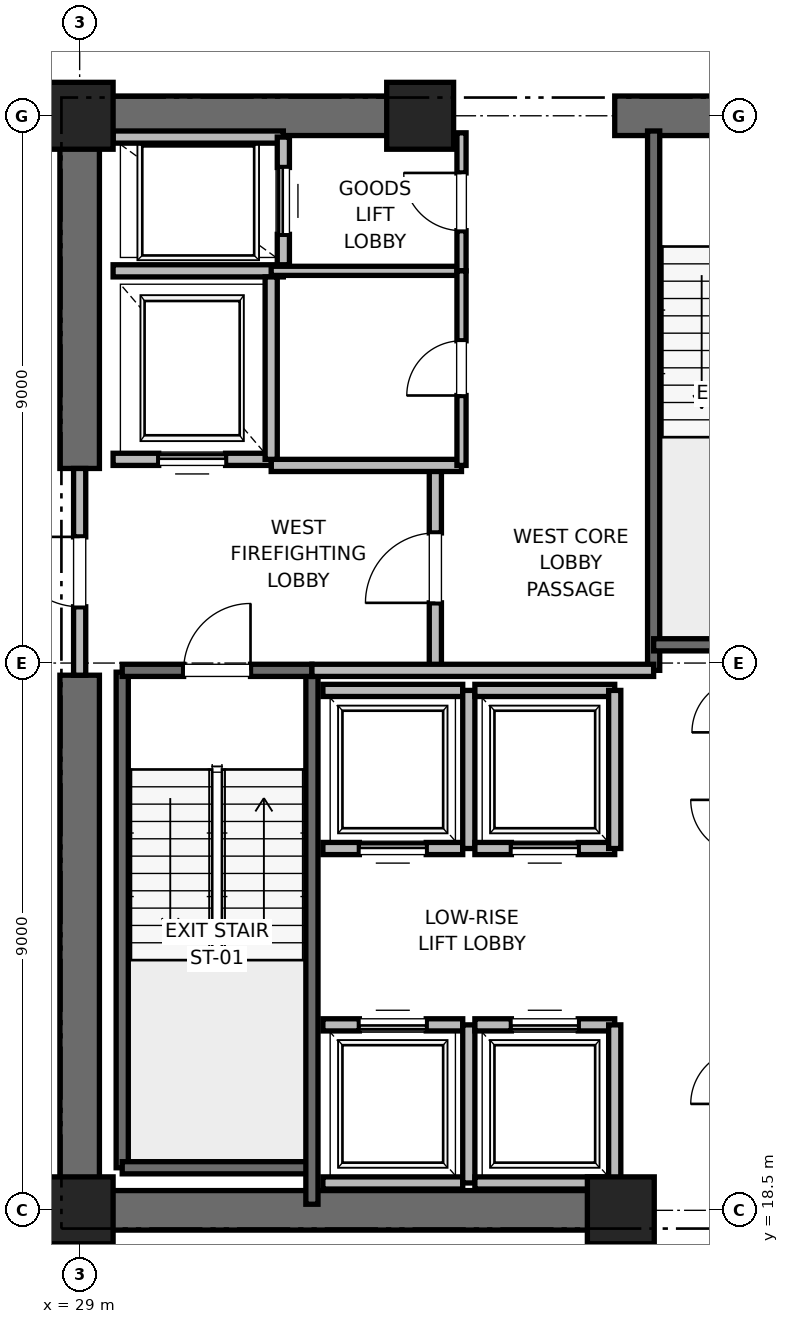
"""IFC4 building model, lengths in metres.
Left out: names, types, materials, properties, quantities, classifications, styles, units other than length and angle.
Written with IfcOpenShell. Run it as: python <this file> out.ifc"""

import sys

from ifc_helpers import new_model, si_unit, direction, frame, frame_2d, origin, origin_2d, place, context, subcontext, project, spatial, rectangle, extrude, element, fill, save


model = new_model("IFC4")
c1 = context("Model", 3, precision=1e-05, world=origin(), true_north=direction((0.0, 1.0)))
c2 = subcontext(c1, "Body", "Model", "MODEL_VIEW")
j1 = project(units=[si_unit("LENGTHUNIT", "METRE"), si_unit("PLANEANGLEUNIT", "RADIAN")], contexts=[c1])
p1 = place(None, origin())
s1 = spatial("IfcSite", under=j1, at=p1, CompositionType="ELEMENT")
p2 = place(p1, origin())
s2 = spatial("IfcBuilding", under=s1, at=p2, CompositionType="ELEMENT")
p3 = place(p2, frame((0.0, 0.0, 43.6)))
s3 = spatial("IfcBuildingStorey", under=s2, at=p3, CompositionType="ELEMENT", Elevation=43.6)
for number, where, z_axis, x_axis in (
    (1, (29.0, 18.5, 0.0), (0.0, 0.0, 1.0), (1.0, 0.0, 0.0)),
    (2, (29.0, 36.5, 0.0), (0.0, 0.0, 1.0), (1.0, 0.0, 0.0)),
    (3, (37.9, 18.5, 0.0), (0.0, 0.0, 1.0), (1.0, 0.0, 0.0)),
    (4, (34.6, 36.5, 0.0), (0.0, 0.0, 1.0), (1.0, 0.0, 0.0)),
):
    element("IfcColumn", number, at=place(p3, frame(where, z_axis=z_axis, x_axis=x_axis)), inside=s3, PredefinedType="PILASTER", context=c2, shape_type="SweptSolid", body=[
        extrude(rectangle(XDim=1.1, YDim=1.1, at=origin_2d()), origin(), (0.0, 0.0, 1.0), 4.0),
    ])
p4 = place(p3, frame((29.0, 18.5, 0.0), z_axis=(0.0, 0.0, 1.0), x_axis=(1.0, 0.0, 0.0)))
e5 = element("IfcWall", 5, at=p4, inside=s3, PredefinedType="SHEAR", context=c2, shape_type="SweptSolid", body=[
    extrude(rectangle(XDim=9.2, YDim=0.65, at=frame_2d((4.6, 0.0))), origin(), (0.0, 0.0, 1.0), 3.76),
])
p5 = place(p3, frame((29.0, 36.5, 0.0), z_axis=(0.0, 0.0, 1.0), x_axis=(1.0, 0.0, 0.0)))
e6 = element("IfcWall", 6, at=p5, inside=s3, PredefinedType="SHEAR", context=c2, shape_type="SweptSolid", body=[
    extrude(rectangle(XDim=5.8, YDim=0.65, at=frame_2d((2.9, 0.0))), origin(), (0.0, 0.0, 1.0), 3.76),
])
p6 = place(p3, frame((37.8, 36.5, 0.0), z_axis=(0.0, 0.0, 1.0), x_axis=(1.0, 0.0, 0.0)))
e7 = element("IfcWall", 7, at=p6, inside=s3, PredefinedType="SHEAR", context=c2, shape_type="SweptSolid", body=[
    extrude(rectangle(XDim=4.4, YDim=0.65, at=frame_2d((2.2, 0.0))), origin(), (0.0, 0.0, 1.0), 3.76),
])
p7 = place(p6, frame((1.65, 0.0, 0.0)))
e8 = element("IfcOpeningElement", 8, at=p7, cuts=e7, PredefinedType="OPENING", context=c2, shape_type="SweptSolid", body=[
    extrude(rectangle(XDim=1.1, YDim=2.15, at=frame_2d((0.55, 1.075))), frame((0.0, 0.325, 0.0), z_axis=(0.0, -1.0, 0.0), x_axis=(1.0, 0.0, 0.0)), (0.0, 0.0, 1.0), 0.65),
])
p8 = place(p3, frame((29.0, 18.5, 0.0), z_axis=(0.0, 0.0, 1.0), x_axis=(0.0, 1.0, 0.0)))
e9 = element("IfcWall", 9, at=p8, inside=s3, PredefinedType="SHEAR", context=c2, shape_type="SweptSolid", body=[
    extrude(rectangle(XDim=8.8, YDim=0.65, at=frame_2d((4.4, 0.0))), origin(), (0.0, 0.0, 1.0), 3.76),
])
p9 = place(p3, frame((29.0, 30.7, 0.0), z_axis=(0.0, 0.0, 1.0), x_axis=(0.0, 1.0, 0.0)))
e10 = element("IfcWall", 10, at=p9, inside=s3, PredefinedType="SHEAR", context=c2, shape_type="SweptSolid", body=[
    extrude(rectangle(XDim=5.8, YDim=0.65, at=frame_2d((2.9, 0.0))), origin(), (0.0, 0.0, 1.0), 3.76),
])
p10 = place(p3, frame((29.7, 19.2, 0.0), z_axis=(0.0, 0.0, 1.0), x_axis=(0.0, 1.0, 0.0)))
e11 = element("IfcWall", 11, at=p10, inside=s3, PredefinedType="SOLIDWALL", context=c2, shape_type="SweptSolid", body=[
    extrude(rectangle(XDim=8.15, YDim=0.2, at=frame_2d((4.075, 0.0))), origin(), (0.0, 0.0, 1.0), 3.76),
])
p11 = place(p3, frame((29.7, 19.2, 0.0), z_axis=(0.0, 0.0, 1.0), x_axis=(1.0, 0.0, 0.0)))
e12 = element("IfcWall", 12, at=p11, inside=s3, PredefinedType="SOLIDWALL", context=c2, shape_type="SweptSolid", body=[
    extrude(rectangle(XDim=3.12, YDim=0.2, at=frame_2d((1.56, 0.0))), origin(), (0.0, 0.0, 1.0), 3.76),
])
p12 = place(p3, frame((32.82, 18.6, 0.0), z_axis=(0.0, 0.0, 1.0), x_axis=(0.0, 1.0, 0.0)))
e13 = element("IfcWall", 13, at=p12, inside=s3, PredefinedType="SOLIDWALL", context=c2, shape_type="SweptSolid", body=[
    extrude(rectangle(XDim=8.78, YDim=0.2, at=frame_2d((4.39, 0.0))), origin(), (0.0, 0.0, 1.0), 3.76),
])
p13 = place(p3, frame((29.7, 27.38, 0.0), z_axis=(0.0, 0.0, 1.0), x_axis=(1.0, 0.0, 0.0)))
e14 = element("IfcWall", 14, at=p13, inside=s3, PredefinedType="SOLIDWALL", context=c2, shape_type="SweptSolid", body=[
    extrude(rectangle(XDim=3.12, YDim=0.2, at=frame_2d((1.56, 0.0))), origin(), (0.0, 0.0, 1.0), 3.76),
])
p14 = place(p13, frame((1.01, 0.0, 0.0)))
e15 = element("IfcOpeningElement", 15, at=p14, cuts=e14, PredefinedType="OPENING", context=c2, shape_type="SweptSolid", body=[
    extrude(rectangle(XDim=1.1, YDim=2.15, at=frame_2d((0.55, 1.075))), frame((0.0, 0.1, 0.0), z_axis=(0.0, -1.0, 0.0), x_axis=(1.0, 0.0, 0.0)), (0.0, 0.0, 1.0), 0.2),
])
p15 = place(p3, frame((38.44, 27.38, 0.0), z_axis=(0.0, 0.0, 1.0), x_axis=(0.0, 1.0, 0.0)))
e16 = element("IfcWall", 16, at=p15, inside=s3, PredefinedType="SOLIDWALL", context=c2, shape_type="SweptSolid", body=[
    extrude(rectangle(XDim=8.87, YDim=0.2, at=frame_2d((4.435, 0.0))), origin(), (0.0, 0.0, 1.0), 3.76),
])
p16 = place(p3, frame((38.44, 27.8, 0.0), z_axis=(0.0, 0.0, 1.0), x_axis=(1.0, 0.0, 0.0)))
e17 = element("IfcWall", 17, at=p16, inside=s3, PredefinedType="SOLIDWALL", context=c2, shape_type="SweptSolid", body=[
    extrude(rectangle(XDim=3.32, YDim=0.2, at=frame_2d((1.66, 0.0))), origin(), (0.0, 0.0, 1.0), 3.76),
])
p17 = place(p3, frame((34.85, 27.38, 0.0), z_axis=(0.0, 0.0, 1.0), x_axis=(0.0, 1.0, 0.0)))
e18 = element("IfcWall", 18, at=p17, inside=s3, PredefinedType="PARTITIONING", context=c2, shape_type="SweptSolid", body=[
    extrude(rectangle(XDim=3.37, YDim=0.2, at=frame_2d((1.685, 0.0))), origin(), (0.0, 0.0, 1.0), 3.76),
])
p18 = place(p17, frame((1.11, 0.0, 0.0)))
e19 = element("IfcOpeningElement", 19, at=p18, cuts=e18, PredefinedType="OPENING", context=c2, shape_type="SweptSolid", body=[
    extrude(rectangle(XDim=1.15, YDim=2.2, at=frame_2d((0.575, 1.1))), frame((0.0, 0.1, 0.0), z_axis=(0.0, -1.0, 0.0), x_axis=(1.0, 0.0, 0.0)), (0.0, 0.0, 1.0), 0.2),
])
p19 = place(p3, frame((29.0, 27.3, 0.0), z_axis=(0.0, 0.0, 1.0), x_axis=(0.0, 1.0, 0.0)))
e20 = element("IfcWall", 20, at=p19, inside=s3, PredefinedType="PARTITIONING", context=c2, shape_type="SweptSolid", body=[
    extrude(rectangle(XDim=3.4, YDim=0.2, at=frame_2d((1.7, 0.0))), origin(), (0.0, 0.0, 1.0), 2.54),
])
p20 = place(p19, frame((1.125, 0.0, 0.0)))
e21 = element("IfcOpeningElement", 21, at=p20, cuts=e20, PredefinedType="OPENING", context=c2, shape_type="SweptSolid", body=[
    extrude(rectangle(XDim=1.15, YDim=2.2, at=frame_2d((0.575, 1.1))), frame((0.0, 0.1, 0.0), z_axis=(0.0, -1.0, 0.0), x_axis=(1.0, 0.0, 0.0)), (0.0, 0.0, 1.0), 0.2),
])
p21 = place(p3, frame((32.82, 27.38, 0.0), z_axis=(0.0, 0.0, 1.0), x_axis=(1.0, 0.0, 0.0)))
e22 = element("IfcWall", 22, at=p21, inside=s3, PredefinedType="PARTITIONING", context=c2, shape_type="SweptSolid", body=[
    extrude(rectangle(XDim=5.62, YDim=0.2, at=frame_2d((2.81, 0.0))), origin(), (0.0, 0.0, 1.0), 3.76),
])
p22 = place(p3, frame((32.15, 30.75, 0.0), z_axis=(0.0, 0.0, 1.0), x_axis=(1.0, 0.0, 0.0)))
e23 = element("IfcWall", 23, at=p22, inside=s3, PredefinedType="PARTITIONING", context=c2, shape_type="SweptSolid", body=[
    extrude(rectangle(XDim=3.13, YDim=0.2, at=frame_2d((1.565, 0.0))), origin(), (0.0, 0.0, 1.0), 3.76),
])
p23 = place(p3, frame((29.55, 30.85, 0.0), z_axis=(0.0, 0.0, 1.0), x_axis=(1.0, 0.0, 0.0)))
e24 = element("IfcWall", 24, at=p23, inside=s3, PredefinedType="SOLIDWALL", context=c2, shape_type="SweptSolid", body=[
    extrude(rectangle(XDim=2.6, YDim=0.2, at=frame_2d((1.3, 0.0))), origin(), (0.0, 0.0, 1.0), 2.54),
])
p24 = place(p23, frame((0.75, 0.0, 0.0)))
e25 = element("IfcOpeningElement", 25, at=p24, cuts=e24, PredefinedType="OPENING", context=c2, shape_type="SweptSolid", body=[
    extrude(rectangle(XDim=1.1, YDim=2.2, at=frame_2d((0.55, 1.1))), frame((0.0, 0.1, 0.0), z_axis=(0.0, -1.0, 0.0), x_axis=(1.0, 0.0, 0.0)), (0.0, 0.0, 1.0), 0.2),
])
p25 = place(p3, frame((29.55, 33.95, 0.0), z_axis=(0.0, 0.0, 1.0), x_axis=(1.0, 0.0, 0.0)))
e26 = element("IfcWall", 26, at=p25, inside=s3, PredefinedType="SOLIDWALL", context=c2, shape_type="SweptSolid", body=[
    extrude(rectangle(XDim=2.8, YDim=0.2, at=frame_2d((1.4, 0.0))), origin(), (0.0, 0.0, 1.0), 3.76),
])
p26 = place(p3, frame((32.15, 30.85, 0.0), z_axis=(0.0, 0.0, 1.0), x_axis=(0.0, 1.0, 0.0)))
e27 = element("IfcWall", 27, at=p26, inside=s3, PredefinedType="SOLIDWALL", context=c2, shape_type="SweptSolid", body=[
    extrude(rectangle(XDim=3.0, YDim=0.2, at=frame_2d((1.5, 0.0))), origin(), (0.0, 0.0, 1.0), 3.76),
])
p27 = place(p3, frame((32.35, 36.15, 0.0), z_axis=(0.0, 0.0, 1.0), x_axis=(-1.0, 0.0, 0.0)))
e28 = element("IfcWall", 28, at=p27, inside=s3, PredefinedType="SOLIDWALL", context=c2, shape_type="SweptSolid", body=[
    extrude(rectangle(XDim=2.8, YDim=0.2, at=frame_2d((1.4, 0.0))), origin(), (0.0, 0.0, 1.0), 2.889),
])
p28 = place(p3, frame((32.35, 34.05, 0.0), z_axis=(0.0, 0.0, 1.0), x_axis=(0.0, 1.0, 0.0)))
e29 = element("IfcWall", 29, at=p28, inside=s3, PredefinedType="SOLIDWALL", context=c2, shape_type="SweptSolid", body=[
    extrude(rectangle(XDim=2.1, YDim=0.2, at=frame_2d((1.05, 0.0))), origin(), (0.0, 0.0, 1.0), 3.76),
])
p29 = place(p28, frame((0.5, 0.0, 0.0)))
e30 = element("IfcOpeningElement", 30, at=p29, cuts=e29, PredefinedType="OPENING", context=c2, shape_type="SweptSolid", body=[
    extrude(rectangle(XDim=1.1, YDim=2.2, at=frame_2d((0.55, 1.1))), frame((0.0, 0.1, 0.0), z_axis=(0.0, -1.0, 0.0), x_axis=(1.0, 0.0, 0.0)), (0.0, 0.0, 1.0), 0.2),
])
p30 = place(p3, frame((33.0, 18.95, 0.0), z_axis=(0.0, 0.0, 1.0), x_axis=(1.0, 0.0, 0.0)))
e31 = element("IfcWall", 31, at=p30, inside=s3, PredefinedType="SOLIDWALL", context=c2, shape_type="SweptSolid", body=[
    extrude(rectangle(XDim=2.3, YDim=0.2, at=frame_2d((1.15, 0.0))), origin(), (0.0, 0.0, 1.0), 3.76),
])
p31 = place(p3, frame((35.3, 21.55, 0.0), z_axis=(0.0, 0.0, 1.0), x_axis=(-1.0, 0.0, 0.0)))
e32 = element("IfcWall", 32, at=p31, inside=s3, PredefinedType="SOLIDWALL", context=c2, shape_type="SweptSolid", body=[
    extrude(rectangle(XDim=2.3, YDim=0.2, at=frame_2d((1.15, 0.0))), origin(), (0.0, 0.0, 1.0), 3.76),
])
p32 = place(p31, frame((0.6, 0.0, 0.0)))
e33 = element("IfcOpeningElement", 33, at=p32, cuts=e32, PredefinedType="OPENING", context=c2, shape_type="SweptSolid", body=[
    extrude(rectangle(XDim=1.1, YDim=2.2, at=frame_2d((0.55, 1.1))), frame((0.0, 0.1, 0.0), z_axis=(0.0, -1.0, 0.0), x_axis=(1.0, 0.0, 0.0)), (0.0, 0.0, 1.0), 0.2),
])
p33 = place(p3, frame((35.4, 18.95, 0.0), z_axis=(0.0, 0.0, 1.0), x_axis=(0.0, 1.0, 0.0)))
e34 = element("IfcWall", 34, at=p33, inside=s3, PredefinedType="SOLIDWALL", context=c2, shape_type="SweptSolid", body=[
    extrude(rectangle(XDim=2.6, YDim=0.2, at=frame_2d((1.3, 0.0))), origin(), (0.0, 0.0, 1.0), 3.76),
])
p34 = place(p3, frame((35.5, 18.95, 0.0), z_axis=(0.0, 0.0, 1.0), x_axis=(1.0, 0.0, 0.0)))
e35 = element("IfcWall", 35, at=p34, inside=s3, PredefinedType="SOLIDWALL", context=c2, shape_type="SweptSolid", body=[
    extrude(rectangle(XDim=2.3, YDim=0.2, at=frame_2d((1.15, 0.0))), origin(), (0.0, 0.0, 1.0), 2.54),
])
p35 = place(p3, frame((37.8, 21.55, 0.0), z_axis=(0.0, 0.0, 1.0), x_axis=(-1.0, 0.0, 0.0)))
e36 = element("IfcWall", 36, at=p35, inside=s3, PredefinedType="SOLIDWALL", context=c2, shape_type="SweptSolid", body=[
    extrude(rectangle(XDim=2.3, YDim=0.2, at=frame_2d((1.15, 0.0))), origin(), (0.0, 0.0, 1.0), 3.76),
])
p36 = place(p35, frame((0.6, 0.0, 0.0)))
e37 = element("IfcOpeningElement", 37, at=p36, cuts=e36, PredefinedType="OPENING", context=c2, shape_type="SweptSolid", body=[
    extrude(rectangle(XDim=1.1, YDim=2.2, at=frame_2d((0.55, 1.1))), frame((0.0, 0.1, 0.0), z_axis=(0.0, -1.0, 0.0), x_axis=(1.0, 0.0, 0.0)), (0.0, 0.0, 1.0), 0.2),
])
p37 = place(p3, frame((37.8, 18.95, 0.0), z_axis=(0.0, 0.0, 1.0), x_axis=(0.0, 1.0, 0.0)))
e38 = element("IfcWall", 38, at=p37, inside=s3, PredefinedType="SOLIDWALL", context=c2, shape_type="SweptSolid", body=[
    extrude(rectangle(XDim=2.6, YDim=0.2, at=frame_2d((1.3, 0.0))), origin(), (0.0, 0.0, 1.0), 2.54),
])
p38 = place(p3, frame((33.0, 24.45, 0.0), z_axis=(0.0, 0.0, 1.0), x_axis=(1.0, 0.0, 0.0)))
e39 = element("IfcWall", 39, at=p38, inside=s3, PredefinedType="SOLIDWALL", context=c2, shape_type="SweptSolid", body=[
    extrude(rectangle(XDim=2.3, YDim=0.2, at=frame_2d((1.15, 0.0))), origin(), (0.0, 0.0, 1.0), 3.76),
])
p39 = place(p38, frame((0.6, 0.0, 0.0)))
e40 = element("IfcOpeningElement", 40, at=p39, cuts=e39, PredefinedType="OPENING", context=c2, shape_type="SweptSolid", body=[
    extrude(rectangle(XDim=1.1, YDim=2.2, at=frame_2d((0.55, 1.1))), frame((0.0, 0.1, 0.0), z_axis=(0.0, -1.0, 0.0), x_axis=(1.0, 0.0, 0.0)), (0.0, 0.0, 1.0), 0.2),
])
p40 = place(p3, frame((35.3, 27.05, 0.0), z_axis=(0.0, 0.0, 1.0), x_axis=(-1.0, 0.0, 0.0)))
e41 = element("IfcWall", 41, at=p40, inside=s3, PredefinedType="SOLIDWALL", context=c2, shape_type="SweptSolid", body=[
    extrude(rectangle(XDim=2.3, YDim=0.2, at=frame_2d((1.15, 0.0))), origin(), (0.0, 0.0, 1.0), 3.76),
])
p41 = place(p3, frame((35.4, 24.45, 0.0), z_axis=(0.0, 0.0, 1.0), x_axis=(0.0, 1.0, 0.0)))
e42 = element("IfcWall", 42, at=p41, inside=s3, PredefinedType="SOLIDWALL", context=c2, shape_type="SweptSolid", body=[
    extrude(rectangle(XDim=2.6, YDim=0.2, at=frame_2d((1.3, 0.0))), origin(), (0.0, 0.0, 1.0), 3.76),
])
p42 = place(p3, frame((35.5, 24.45, 0.0), z_axis=(0.0, 0.0, 1.0), x_axis=(1.0, 0.0, 0.0)))
e43 = element("IfcWall", 43, at=p42, inside=s3, PredefinedType="SOLIDWALL", context=c2, shape_type="SweptSolid", body=[
    extrude(rectangle(XDim=2.3, YDim=0.2, at=frame_2d((1.15, 0.0))), origin(), (0.0, 0.0, 1.0), 3.76),
])
p43 = place(p42, frame((0.6, 0.0, 0.0)))
e44 = element("IfcOpeningElement", 44, at=p43, cuts=e43, PredefinedType="OPENING", context=c2, shape_type="SweptSolid", body=[
    extrude(rectangle(XDim=1.1, YDim=2.2, at=frame_2d((0.55, 1.1))), frame((0.0, 0.1, 0.0), z_axis=(0.0, -1.0, 0.0), x_axis=(1.0, 0.0, 0.0)), (0.0, 0.0, 1.0), 0.2),
])
p44 = place(p3, frame((37.8, 27.05, 0.0), z_axis=(0.0, 0.0, 1.0), x_axis=(-1.0, 0.0, 0.0)))
e45 = element("IfcWall", 45, at=p44, inside=s3, PredefinedType="SOLIDWALL", context=c2, shape_type="SweptSolid", body=[
    extrude(rectangle(XDim=2.3, YDim=0.2, at=frame_2d((1.15, 0.0))), origin(), (0.0, 0.0, 1.0), 3.76),
])
p45 = place(p3, frame((37.8, 24.45, 0.0), z_axis=(0.0, 0.0, 1.0), x_axis=(0.0, 1.0, 0.0)))
e46 = element("IfcWall", 46, at=p45, inside=s3, PredefinedType="SOLIDWALL", context=c2, shape_type="SweptSolid", body=[
    extrude(rectangle(XDim=2.6, YDim=0.2, at=frame_2d((1.3, 0.0))), origin(), (0.0, 0.0, 1.0), 3.76),
])
p46 = place(p3, frame((32.15, 33.95, 0.0), z_axis=(0.0, 0.0, 1.0), x_axis=(1.0, 0.0, 0.0)))
e47 = element("IfcWall", 47, at=p46, inside=s3, PredefinedType="PARTITIONING", context=c2, shape_type="SweptSolid", body=[
    extrude(rectangle(XDim=3.13, YDim=0.15, at=frame_2d((1.565, 0.0))), origin(), (0.0, 0.0, 1.0), 2.85),
])
p47 = place(p3, frame((35.28, 33.95, 0.0), z_axis=(0.0, 0.0, 1.0), x_axis=(0.0, 1.0, 0.0)))
e48 = element("IfcWall", 48, at=p47, inside=s3, PredefinedType="PARTITIONING", context=c2, shape_type="SweptSolid", body=[
    extrude(rectangle(XDim=2.27, YDim=0.15, at=frame_2d((1.135, 0.0))), origin(), (0.0, 0.0, 1.0), 2.54),
])
p48 = place(p47, frame((0.66, 0.0, 0.0)))
e49 = element("IfcOpeningElement", 49, at=p48, cuts=e48, PredefinedType="OPENING", context=c2, shape_type="SweptSolid", body=[
    extrude(rectangle(XDim=0.95, YDim=2.15, at=frame_2d((0.475, 1.075))), frame((0.0, 0.075, 0.0), z_axis=(0.0, -1.0, 0.0), x_axis=(1.0, 0.0, 0.0)), (0.0, 0.0, 1.0), 0.15),
])
p49 = place(p3, frame((35.28, 30.75, 0.0), z_axis=(0.0, 0.0, 1.0), x_axis=(0.0, 1.0, 0.0)))
e50 = element("IfcWall", 50, at=p49, inside=s3, PredefinedType="PARTITIONING", context=c2, shape_type="SweptSolid", body=[
    extrude(rectangle(XDim=3.2, YDim=0.15, at=frame_2d((1.6, 0.0))), origin(), (0.0, 0.0, 1.0), 2.85),
])
p50 = place(p49, frame((1.15, 0.0, 0.0)))
e51 = element("IfcOpeningElement", 51, at=p50, cuts=e50, PredefinedType="OPENING", context=c2, shape_type="SweptSolid", body=[
    extrude(rectangle(XDim=0.9, YDim=2.1, at=frame_2d((0.45, 1.05))), frame((0.0, 0.075, 0.0), z_axis=(0.0, -1.0, 0.0), x_axis=(1.0, 0.0, 0.0)), (0.0, 0.0, 1.0), 0.15),
])
p51 = place(p14, origin())
e52 = element("IfcDoor", 52, at=p51, inside=s3, OperationType="SINGLE_SWING_RIGHT", PredefinedType="DOOR", context=c2, shape_type="SweptSolid", body=[
    extrude(rectangle(XDim=1.1, YDim=2.15, at=frame_2d((0.55, 1.075))), frame((0.0, 0.025, 0.0), z_axis=(0.0, -1.0, 0.0), x_axis=(1.0, 0.0, 0.0)), (0.0, 0.0, 1.0), 0.05),
])
fill(e15, e52)
p52 = place(p18, origin())
e53 = element("IfcDoor", 53, at=p52, inside=s3, OperationType="SINGLE_SWING_LEFT", PredefinedType="DOOR", context=c2, shape_type="SweptSolid", body=[
    extrude(rectangle(XDim=1.15, YDim=2.2, at=frame_2d((0.575, 1.1))), frame((0.0, 0.025, 0.0), z_axis=(0.0, -1.0, 0.0), x_axis=(1.0, 0.0, 0.0)), (0.0, 0.0, 1.0), 0.05),
])
fill(e19, e53)
p53 = place(p20, origin())
e54 = element("IfcDoor", 54, at=p53, inside=s3, OperationType="SINGLE_SWING_RIGHT", PredefinedType="DOOR", context=c2, shape_type="SweptSolid", body=[
    extrude(rectangle(XDim=1.15, YDim=2.2, at=frame_2d((0.575, 1.1))), frame((0.0, 0.025, 0.0), z_axis=(0.0, -1.0, 0.0), x_axis=(1.0, 0.0, 0.0)), (0.0, 0.0, 1.0), 0.05),
])
fill(e21, e54)
p54 = place(p24, origin())
e55 = element("IfcDoor", 55, at=p54, inside=s3, OperationType="SLIDING_TO_RIGHT", PredefinedType="DOOR", context=c2, shape_type="SweptSolid", body=[
    extrude(rectangle(XDim=1.1, YDim=2.2, at=frame_2d((0.55, 1.1))), frame((0.0, 0.025, 0.0), z_axis=(0.0, -1.0, 0.0), x_axis=(1.0, 0.0, 0.0)), (0.0, 0.0, 1.0), 0.05),
])
fill(e25, e55)
p55 = place(p29, origin())
e56 = element("IfcDoor", 56, at=p55, inside=s3, OperationType="SLIDING_TO_RIGHT", PredefinedType="DOOR", context=c2, shape_type="SweptSolid", body=[
    extrude(rectangle(XDim=1.1, YDim=2.2, at=frame_2d((0.55, 1.1))), frame((0.0, 0.025, 0.0), z_axis=(0.0, -1.0, 0.0), x_axis=(1.0, 0.0, 0.0)), (0.0, 0.0, 1.0), 0.05),
])
fill(e30, e56)
p56 = place(p32, origin())
e57 = element("IfcDoor", 57, at=p56, inside=s3, OperationType="SLIDING_TO_RIGHT", PredefinedType="DOOR", context=c2, shape_type="SweptSolid", body=[
    extrude(rectangle(XDim=1.1, YDim=2.2, at=frame_2d((0.55, 1.1))), frame((0.0, 0.025, 0.0), z_axis=(0.0, -1.0, 0.0), x_axis=(1.0, 0.0, 0.0)), (0.0, 0.0, 1.0), 0.05),
])
fill(e33, e57)
p57 = place(p36, origin())
e58 = element("IfcDoor", 58, at=p57, inside=s3, OperationType="SLIDING_TO_RIGHT", PredefinedType="DOOR", context=c2, shape_type="SweptSolid", body=[
    extrude(rectangle(XDim=1.1, YDim=2.2, at=frame_2d((0.55, 1.1))), frame((0.0, 0.025, 0.0), z_axis=(0.0, -1.0, 0.0), x_axis=(1.0, 0.0, 0.0)), (0.0, 0.0, 1.0), 0.05),
])
fill(e37, e58)
p58 = place(p39, origin())
e59 = element("IfcDoor", 59, at=p58, inside=s3, OperationType="SLIDING_TO_RIGHT", PredefinedType="DOOR", context=c2, shape_type="SweptSolid", body=[
    extrude(rectangle(XDim=1.1, YDim=2.2, at=frame_2d((0.55, 1.1))), frame((0.0, 0.025, 0.0), z_axis=(0.0, -1.0, 0.0), x_axis=(1.0, 0.0, 0.0)), (0.0, 0.0, 1.0), 0.05),
])
fill(e40, e59)
p59 = place(p43, origin())
e60 = element("IfcDoor", 60, at=p59, inside=s3, OperationType="SLIDING_TO_RIGHT", PredefinedType="DOOR", context=c2, shape_type="SweptSolid", body=[
    extrude(rectangle(XDim=1.1, YDim=2.2, at=frame_2d((0.55, 1.1))), frame((0.0, 0.025, 0.0), z_axis=(0.0, -1.0, 0.0), x_axis=(1.0, 0.0, 0.0)), (0.0, 0.0, 1.0), 0.05),
])
fill(e44, e60)
p60 = place(p48, origin())
e61 = element("IfcDoor", 61, at=p60, inside=s3, OperationType="SINGLE_SWING_RIGHT", PredefinedType="DOOR", context=c2, shape_type="SweptSolid", body=[
    extrude(rectangle(XDim=0.95, YDim=2.15, at=frame_2d((0.475, 1.075))), frame((0.0, 0.025, 0.0), z_axis=(0.0, -1.0, 0.0), x_axis=(1.0, 0.0, 0.0)), (0.0, 0.0, 1.0), 0.05),
])
fill(e49, e61)
p61 = place(p50, origin())
e62 = element("IfcDoor", 62, at=p61, inside=s3, OperationType="SINGLE_SWING_LEFT", PredefinedType="DOOR", context=c2, shape_type="SweptSolid", body=[
    extrude(rectangle(XDim=0.9, YDim=2.1, at=frame_2d((0.45, 1.05))), frame((0.0, 0.025, 0.0), z_axis=(0.0, -1.0, 0.0), x_axis=(1.0, 0.0, 0.0)), (0.0, 0.0, 1.0), 0.05),
])
fill(e51, e62)
save(model, sys.argv[1])
